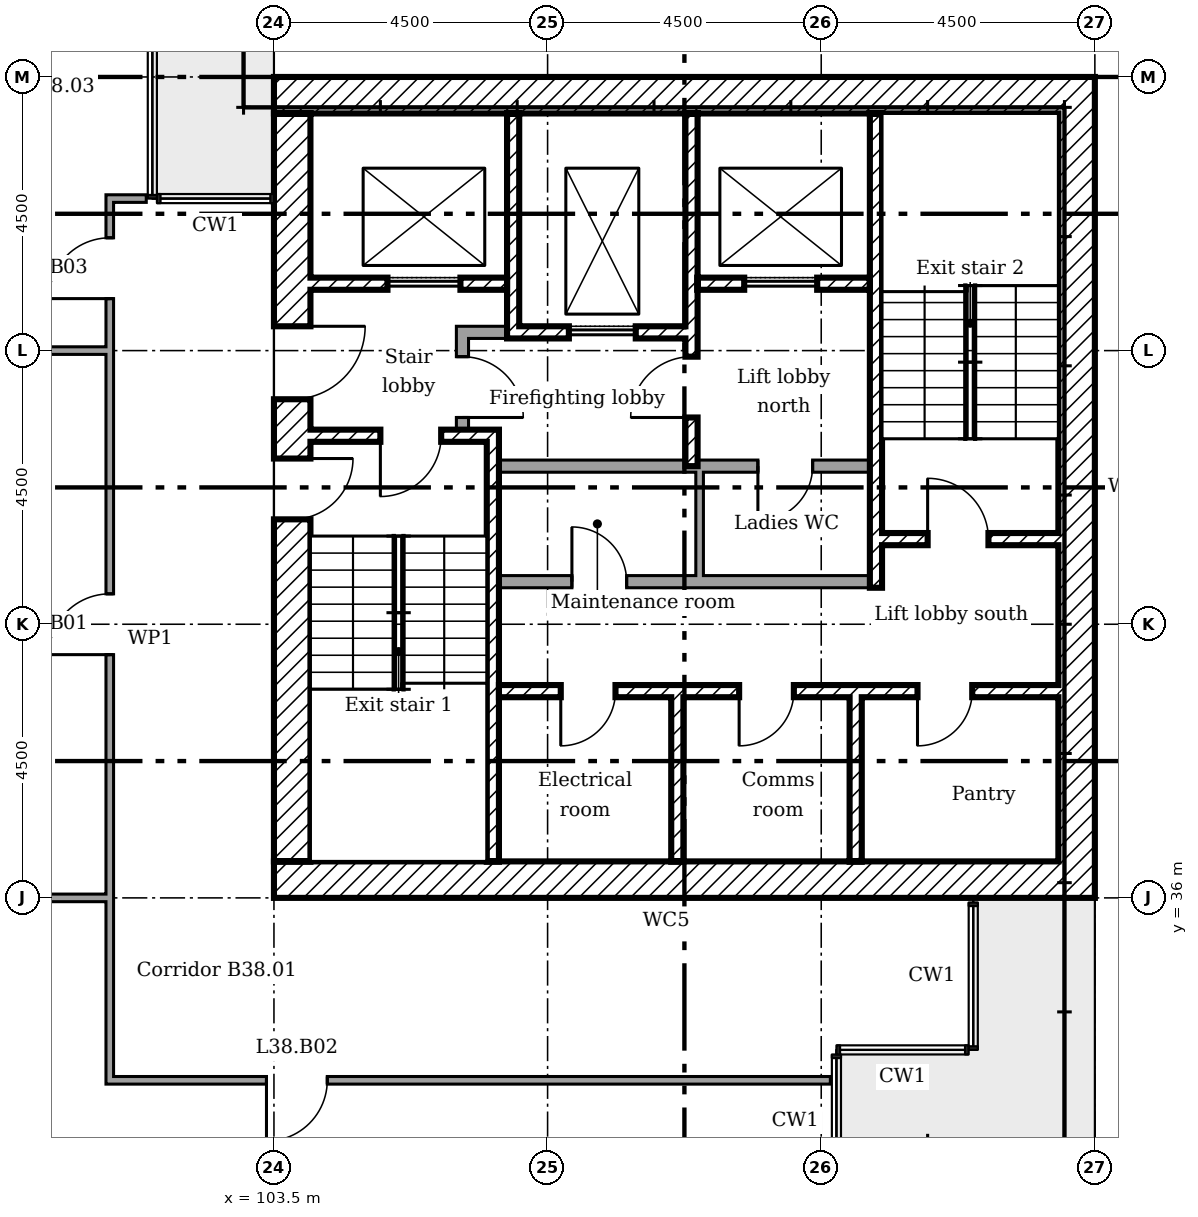
"""IFC4 building model, lengths in metres.
Left out: names, types, materials, properties, quantities, classifications, styles, units other than length and angle.
Written with IfcOpenShell. Run it as: python <this file> out.ifc"""

import sys

from ifc_helpers import new_model, si_unit, direction, frame, frame_2d, origin, place, context, subcontext, project, spatial, rectangle, extrude, element, fill, save


model = new_model("IFC4")
c1 = context("Model", 3, precision=1e-05, world=origin(), true_north=direction((0.0, 1.0)))
c2 = subcontext(c1, "Body", "Model", "MODEL_VIEW")
j1 = project(units=[si_unit("LENGTHUNIT", "METRE"), si_unit("PLANEANGLEUNIT", "RADIAN")], contexts=[c1])
p1 = place(None, origin())
s1 = spatial("IfcSite", under=j1, at=p1, CompositionType="ELEMENT")
p2 = place(p1, origin())
s2 = spatial("IfcBuilding", under=s1, at=p2, CompositionType="ELEMENT")
p3 = place(p2, frame((0.0, 0.0, 154.6)))
s3 = spatial("IfcBuildingStorey", under=s2, at=p3, CompositionType="ELEMENT", Elevation=154.6)
p4 = place(p3, frame((116.7, 36.0, 0.0), z_axis=(0.0, 0.0, 1.0), x_axis=(0.0, 1.0, 0.0)))
e1 = element("IfcWall", 1, at=p4, inside=s3, PredefinedType="SHEAR", context=c2, shape_type="SweptSolid", body=[
    extrude(rectangle(XDim=13.5, YDim=0.6, at=frame_2d((6.75, 0.0))), origin(), (0.0, 0.0, 1.0), 3.35),
])
for number, where in (
    (2, (103.5, 49.2, 0.0)),
    (3, (103.5, 36.3, 0.0)),
):
    element("IfcWall", number, at=place(p3, frame(where)), inside=s3, PredefinedType="SHEAR", context=c2, shape_type="SweptSolid", body=[
        extrude(rectangle(XDim=12.9, YDim=0.6, at=frame_2d((6.45, 0.0))), origin(), (0.0, 0.0, 1.0), 3.35),
    ])
p5 = place(p3, frame((103.8, 36.6, 0.0), z_axis=(0.0, 0.0, 1.0), x_axis=(0.0, 1.0, 0.0)))
e4 = element("IfcWall", 4, at=p5, inside=s3, PredefinedType="SHEAR", context=c2, shape_type="SweptSolid", body=[
    extrude(rectangle(XDim=12.3, YDim=0.6, at=frame_2d((6.15, 0.0))), origin(), (0.0, 0.0, 1.0), 3.35),
])
p6 = place(p5, frame((7.6, 0.0, 0.0)))
e5 = element("IfcOpeningElement", 5, at=p6, cuts=e4, PredefinedType="OPENING", context=c2, shape_type="SweptSolid", body=[
    extrude(rectangle(XDim=1.2, YDim=2.1, at=frame_2d((0.6, 1.05))), frame((0.0, 0.31, 0.0), z_axis=(0.0, -1.0, 0.0), x_axis=(1.0, 0.0, 0.0)), (0.0, 0.0, 1.0), 0.62),
])
p7 = place(p5, frame((5.625, 0.0, 0.0)))
e6 = element("IfcOpeningElement", 6, at=p7, cuts=e4, PredefinedType="OPENING", context=c2, shape_type="SweptSolid", body=[
    extrude(rectangle(XDim=1.0, YDim=2.1, at=frame_2d((0.5, 1.05))), frame((0.0, 0.31, 0.0), z_axis=(0.0, -1.0, 0.0), x_axis=(1.0, 0.0, 0.0)), (0.0, 0.0, 1.0), 0.62),
])
p8 = place(p3, frame((107.433, 48.9, 0.0), z_axis=(0.0, 0.0, 1.0), x_axis=(0.0, -1.0, 0.0)))
e7 = element("IfcWall", 7, at=p8, inside=s3, PredefinedType="SHEAR", context=c2, shape_type="SweptSolid", body=[
    extrude(rectangle(XDim=3.7, YDim=0.2, at=frame_2d((1.85, 0.0))), origin(), (0.0, 0.0, 1.0), 3.35),
])
p9 = place(p3, frame((110.367, 48.9, 0.0), z_axis=(0.0, 0.0, 1.0), x_axis=(0.0, -1.0, 0.0)))
e8 = element("IfcWall", 8, at=p9, inside=s3, PredefinedType="SHEAR", context=c2, shape_type="SweptSolid", body=[
    extrude(rectangle(XDim=5.8, YDim=0.2, at=frame_2d((2.9, 0.0))), origin(), (0.0, 0.0, 1.0), 3.35),
])
p10 = place(p9, frame((4.0, 0.0, 0.0)))
e9 = element("IfcOpeningElement", 9, at=p10, cuts=e8, PredefinedType="OPENING", context=c2, shape_type="SweptSolid", body=[
    extrude(rectangle(XDim=1.0, YDim=2.1, at=frame_2d((0.5, 1.05))), frame((0.0, 0.11, 0.0), z_axis=(0.0, -1.0, 0.0), x_axis=(1.0, 0.0, 0.0)), (0.0, 0.0, 1.0), 0.22),
])
for number, where, z_axis, x_axis in (
    (10, (110.133, 36.6, 0.0), (0.0, 0.0, 1.0), (0.0, 1.0, 0.0)),
    (11, (113.067, 36.6, 0.0), (0.0, 0.0, 1.0), (0.0, 1.0, 0.0)),
):
    element("IfcWall", number, at=place(p3, frame(where, z_axis=z_axis, x_axis=x_axis)), inside=s3, PredefinedType="SHEAR", context=c2, shape_type="SweptSolid", body=[
        extrude(rectangle(XDim=2.7, YDim=0.2, at=frame_2d((1.35, 0.0))), origin(), (0.0, 0.0, 1.0), 3.35),
    ])
p11 = place(p3, frame((106.5, 45.3, 0.0)))
e12 = element("IfcWall", 12, at=p11, inside=s3, PredefinedType="PARTITIONING", context=c2, shape_type="SweptSolid", body=[
    extrude(rectangle(XDim=0.833, YDim=0.2, at=frame_2d((0.417, 0.0))), origin(), (0.0, 0.0, 1.0), 3.35),
])
p12 = place(p3, frame((106.6, 43.7, 0.0), z_axis=(0.0, 0.0, 1.0), x_axis=(0.0, 1.0, 0.0)))
e13 = element("IfcWall", 13, at=p12, inside=s3, PredefinedType="PARTITIONING", context=c2, shape_type="SweptSolid", body=[
    extrude(rectangle(XDim=1.5, YDim=0.2, at=frame_2d((0.75, 0.0))), origin(), (0.0, 0.0, 1.0), 3.35),
])
p13 = place(p12, frame((0.2, 0.0, 0.0)))
e14 = element("IfcOpeningElement", 14, at=p13, cuts=e13, PredefinedType="OPENING", context=c2, shape_type="SweptSolid", body=[
    extrude(rectangle(XDim=1.0, YDim=2.1, at=frame_2d((0.5, 1.05))), frame((0.0, 0.11, 0.0), z_axis=(0.0, -1.0, 0.0), x_axis=(1.0, 0.0, 0.0)), (0.0, 0.0, 1.0), 0.22),
])
p14 = place(p3, frame((104.1, 46.1, 0.0)))
e15 = element("IfcWall", 15, at=p14, inside=s3, PredefinedType="SHEAR", context=c2, shape_type="SweptSolid", body=[
    extrude(rectangle(XDim=3.233, YDim=0.2, at=frame_2d((1.617, 0.0))), origin(), (0.0, 0.0, 1.0), 3.35),
])
p15 = place(p14, frame((1.267, 0.0, 0.0)))
e16 = element("IfcOpeningElement", 16, at=p15, cuts=e15, PredefinedType="OPENING", context=c2, shape_type="SweptSolid", body=[
    extrude(rectangle(XDim=1.2, YDim=2.1, at=frame_2d((0.6, 1.05))), frame((0.0, 0.11, 0.0), z_axis=(0.0, -1.0, 0.0), x_axis=(1.0, 0.0, 0.0)), (0.0, 0.0, 1.0), 0.22),
])
p16 = place(p3, frame((110.467, 46.1, 0.0)))
e17 = element("IfcWall", 17, at=p16, inside=s3, PredefinedType="SHEAR", context=c2, shape_type="SweptSolid", body=[
    extrude(rectangle(XDim=2.833, YDim=0.2, at=frame_2d((1.417, 0.0))), origin(), (0.0, 0.0, 1.0), 3.35),
])
p17 = place(p16, frame((0.767, 0.0, 0.0)))
e18 = element("IfcOpeningElement", 18, at=p17, cuts=e17, PredefinedType="OPENING", context=c2, shape_type="SweptSolid", body=[
    extrude(rectangle(XDim=1.2, YDim=2.1, at=frame_2d((0.6, 1.05))), frame((0.0, 0.11, 0.0), z_axis=(0.0, -1.0, 0.0), x_axis=(1.0, 0.0, 0.0)), (0.0, 0.0, 1.0), 0.22),
])
p18 = place(p3, frame((107.533, 45.3, 0.0)))
e19 = element("IfcWall", 19, at=p18, inside=s3, PredefinedType="SHEAR", context=c2, shape_type="SweptSolid", body=[
    extrude(rectangle(XDim=2.733, YDim=0.2, at=frame_2d((1.367, 0.0))), origin(), (0.0, 0.0, 1.0), 3.35),
])
p19 = place(p18, frame((0.817, 0.0, 0.0)))
e20 = element("IfcOpeningElement", 20, at=p19, cuts=e19, PredefinedType="OPENING", context=c2, shape_type="SweptSolid", body=[
    extrude(rectangle(XDim=1.1, YDim=2.1, at=frame_2d((0.55, 1.05))), frame((0.0, 0.11, 0.0), z_axis=(0.0, -1.0, 0.0), x_axis=(1.0, 0.0, 0.0)), (0.0, 0.0, 1.0), 0.22),
])
p20 = place(p3, frame((107.2, 39.4, 0.0)))
e21 = element("IfcWall", 21, at=p20, inside=s3, PredefinedType="SHEAR", context=c2, shape_type="SweptSolid", body=[
    extrude(rectangle(XDim=9.2, YDim=0.2, at=frame_2d((4.6, 0.0))), origin(), (0.0, 0.0, 1.0), 3.35),
])
p21 = place(p20, frame((1.017, 0.0, 0.0)))
e22 = element("IfcOpeningElement", 22, at=p21, cuts=e21, PredefinedType="OPENING", context=c2, shape_type="SweptSolid", body=[
    extrude(rectangle(XDim=0.9, YDim=2.1, at=frame_2d((0.45, 1.05))), frame((0.0, 0.11, 0.0), z_axis=(0.0, -1.0, 0.0), x_axis=(1.0, 0.0, 0.0)), (0.0, 0.0, 1.0), 0.22),
])
p22 = place(p20, frame((3.95, 0.0, 0.0)))
e23 = element("IfcOpeningElement", 23, at=p22, cuts=e21, PredefinedType="OPENING", context=c2, shape_type="SweptSolid", body=[
    extrude(rectangle(XDim=0.9, YDim=2.1, at=frame_2d((0.45, 1.05))), frame((0.0, 0.11, 0.0), z_axis=(0.0, -1.0, 0.0), x_axis=(1.0, 0.0, 0.0)), (0.0, 0.0, 1.0), 0.22),
])
p23 = place(p20, frame((6.883, 0.0, 0.0)))
e24 = element("IfcOpeningElement", 24, at=p23, cuts=e21, PredefinedType="OPENING", context=c2, shape_type="SweptSolid", body=[
    extrude(rectangle(XDim=0.9, YDim=2.1, at=frame_2d((0.45, 1.05))), frame((0.0, 0.11, 0.0), z_axis=(0.0, -1.0, 0.0), x_axis=(1.0, 0.0, 0.0)), (0.0, 0.0, 1.0), 0.22),
])
p24 = place(p3, frame((107.1, 36.6, 0.0), z_axis=(0.0, 0.0, 1.0), x_axis=(0.0, 1.0, 0.0)))
e25 = element("IfcWall", 25, at=p24, inside=s3, PredefinedType="SHEAR", context=c2, shape_type="SweptSolid", body=[
    extrude(rectangle(XDim=7.1, YDim=0.2, at=frame_2d((3.55, 0.0))), origin(), (0.0, 0.0, 1.0), 3.35),
])
p25 = place(p3, frame((104.1, 43.6, 0.0)))
e26 = element("IfcWall", 26, at=p25, inside=s3, PredefinedType="SHEAR", context=c2, shape_type="SweptSolid", body=[
    extrude(rectangle(XDim=2.9, YDim=0.2, at=frame_2d((1.45, 0.0))), origin(), (0.0, 0.0, 1.0), 3.35),
])
p26 = place(p25, frame((1.15, 0.0, 0.0)))
e27 = element("IfcOpeningElement", 27, at=p26, cuts=e26, PredefinedType="OPENING", context=c2, shape_type="SweptSolid", body=[
    extrude(rectangle(XDim=1.0, YDim=2.1, at=frame_2d((0.5, 1.05))), frame((0.0, 0.11, 0.0), z_axis=(0.0, -1.0, 0.0), x_axis=(1.0, 0.0, 0.0)), (0.0, 0.0, 1.0), 0.22),
])
p27 = place(p3, frame((113.5, 41.9, 0.0)))
e28 = element("IfcWall", 28, at=p27, inside=s3, PredefinedType="SHEAR", context=c2, shape_type="SweptSolid", body=[
    extrude(rectangle(XDim=2.9, YDim=0.2, at=frame_2d((1.45, 0.0))), origin(), (0.0, 0.0, 1.0), 3.35),
])
p28 = place(p27, frame((0.75, 0.0, 0.0)))
e29 = element("IfcOpeningElement", 29, at=p28, cuts=e28, PredefinedType="OPENING", context=c2, shape_type="SweptSolid", body=[
    extrude(rectangle(XDim=1.0, YDim=2.1, at=frame_2d((0.5, 1.05))), frame((0.0, 0.11, 0.0), z_axis=(0.0, -1.0, 0.0), x_axis=(1.0, 0.0, 0.0)), (0.0, 0.0, 1.0), 0.22),
])
p29 = place(p3, frame((113.4, 41.1, 0.0), z_axis=(0.0, 0.0, 1.0), x_axis=(0.0, 1.0, 0.0)))
e30 = element("IfcWall", 30, at=p29, inside=s3, PredefinedType="SHEAR", context=c2, shape_type="SweptSolid", body=[
    extrude(rectangle(XDim=7.8, YDim=0.2, at=frame_2d((3.9, 0.0))), origin(), (0.0, 0.0, 1.0), 3.35),
])
p30 = place(p3, frame((107.2, 43.1, 0.0)))
e31 = element("IfcWall", 31, at=p30, inside=s3, PredefinedType="PARTITIONING", context=c2, shape_type="SweptSolid", body=[
    extrude(rectangle(XDim=6.1, YDim=0.2, at=frame_2d((3.05, 0.0))), origin(), (0.0, 0.0, 1.0), 3.35),
])
p31 = place(p30, frame((4.259, 0.0, 0.0)))
e32 = element("IfcOpeningElement", 32, at=p31, cuts=e31, PredefinedType="OPENING", context=c2, shape_type="SweptSolid", body=[
    extrude(rectangle(XDim=0.9, YDim=2.1, at=frame_2d((0.45, 1.05))), frame((0.0, 0.11, 0.0), z_axis=(0.0, -1.0, 0.0), x_axis=(1.0, 0.0, 0.0)), (0.0, 0.0, 1.0), 0.22),
])
p32 = place(p3, frame((107.2, 41.2, 0.0)))
e33 = element("IfcWall", 33, at=p32, inside=s3, PredefinedType="PARTITIONING", context=c2, shape_type="SweptSolid", body=[
    extrude(rectangle(XDim=6.1, YDim=0.2, at=frame_2d((3.05, 0.0))), origin(), (0.0, 0.0, 1.0), 3.35),
])
p33 = place(p32, frame((1.2, 0.0, 0.0)))
e34 = element("IfcOpeningElement", 34, at=p33, cuts=e33, PredefinedType="OPENING", context=c2, shape_type="SweptSolid", body=[
    extrude(rectangle(XDim=0.9, YDim=2.1, at=frame_2d((0.45, 1.05))), frame((0.0, 0.11, 0.0), z_axis=(0.0, -1.0, 0.0), x_axis=(1.0, 0.0, 0.0)), (0.0, 0.0, 1.0), 0.22),
])
p34 = place(p3, frame((110.5, 41.3, 0.0), z_axis=(0.0, 0.0, 1.0), x_axis=(0.0, 1.0, 0.0)))
e35 = element("IfcWall", 35, at=p34, inside=s3, PredefinedType="PARTITIONING", context=c2, shape_type="SweptSolid", body=[
    extrude(rectangle(XDim=1.7, YDim=0.125, at=frame_2d((0.85, 0.0))), origin(), (0.0, 0.0, 1.0), 3.35),
])
p35 = place(p3, frame((100.738, 33.0, 0.0)))
e36 = element("IfcWall", 36, at=p35, inside=s3, PredefinedType="PARTITIONING", context=c2, shape_type="SweptSolid", body=[
    extrude(rectangle(XDim=11.912, YDim=0.125, at=frame_2d((5.956, 0.0))), origin(), (0.0, 0.0, 1.0), 3.45),
])
p36 = place(p35, frame((2.639, 0.0, 0.0)))
e37 = element("IfcOpeningElement", 37, at=p36, cuts=e36, PredefinedType="OPENING", context=c2, shape_type="SweptSolid", body=[
    extrude(rectangle(XDim=1.0, YDim=2.1, at=frame_2d((0.5, 1.05))), frame((0.0, 0.073, 0.0), z_axis=(0.0, -1.0, 0.0), x_axis=(1.0, 0.0, 0.0)), (0.0, 0.0, 1.0), 0.145),
])
p37 = place(p3, frame((99.35, 36.0, 0.0)))
e38 = element("IfcWall", 38, at=p37, inside=s3, PredefinedType="PARTITIONING", context=c2, shape_type="SweptSolid", body=[
    extrude(rectangle(XDim=1.45, YDim=0.125, at=frame_2d((0.725, 0.0))), origin(), (0.0, 0.0, 1.0), 2.842),
])
p38 = place(p3, frame((96.6, 45.0, 0.0)))
e39 = element("IfcWall", 39, at=p38, inside=s3, PredefinedType="PARTITIONING", context=c2, shape_type="SweptSolid", body=[
    extrude(rectangle(XDim=4.2, YDim=0.125, at=frame_2d((2.1, 0.0))), origin(), (0.0, 0.0, 1.0), 2.851),
])
p39 = place(p3, frame((100.738, 47.5, 0.0)))
e40 = element("IfcWall", 40, at=p39, inside=s3, PredefinedType="PARTITIONING", context=c2, shape_type="SweptSolid", body=[
    extrude(rectangle(XDim=0.662, YDim=0.125, at=frame_2d((0.331, 0.0))), origin(), (0.0, 0.0, 1.0), 3.45),
])
p40 = place(p3, frame((100.8, 33.062, 0.0), z_axis=(0.0, 0.0, 1.0), x_axis=(0.0, 1.0, 0.0)))
e41 = element("IfcWall", 41, at=p40, inside=s3, PredefinedType="PARTITIONING", context=c2, shape_type="SweptSolid", body=[
    extrude(rectangle(XDim=14.375, YDim=0.125, at=frame_2d((7.188, 0.0))), origin(), (0.0, 0.0, 1.0), 3.45),
])
p41 = place(p40, frame((6.938, 0.0, 0.0)))
e42 = element("IfcOpeningElement", 42, at=p41, cuts=e41, PredefinedType="OPENING", context=c2, shape_type="SweptSolid", body=[
    extrude(rectangle(XDim=1.0, YDim=2.1, at=frame_2d((0.5, 1.05))), frame((0.0, 0.073, 0.0), z_axis=(0.0, -1.0, 0.0), x_axis=(1.0, 0.0, 0.0)), (0.0, 0.0, 1.0), 0.145),
])
p42 = place(p40, frame((12.792, 0.0, 0.0)))
e43 = element("IfcOpeningElement", 43, at=p42, cuts=e41, PredefinedType="OPENING", context=c2, shape_type="SweptSolid", body=[
    extrude(rectangle(XDim=1.0, YDim=2.1, at=frame_2d((0.5, 1.05))), frame((0.0, 0.073, 0.0), z_axis=(0.0, -1.0, 0.0), x_axis=(1.0, 0.0, 0.0)), (0.0, 0.0, 1.0), 0.145),
])
p43 = place(p6, frame((1.2, 0.0, 0.0), x_axis=(-1.0, 0.0, 0.0)))
e44 = element("IfcDoor", 44, at=p43, inside=s3, OperationType="SINGLE_SWING_RIGHT", PredefinedType="DOOR", context=c2, shape_type="SweptSolid", body=[
    extrude(rectangle(XDim=1.2, YDim=2.1, at=frame_2d((0.6, 1.05))), frame((0.0, 0.025, 0.0), z_axis=(0.0, -1.0, 0.0), x_axis=(1.0, 0.0, 0.0)), (0.0, 0.0, 1.0), 0.05),
])
fill(e5, e44)
p44 = place(p26, frame((1.0, 0.0, 0.0), x_axis=(-1.0, 0.0, 0.0)))
e45 = element("IfcDoor", 45, at=p44, inside=s3, OperationType="SINGLE_SWING_LEFT", PredefinedType="DOOR", context=c2, shape_type="SweptSolid", body=[
    extrude(rectangle(XDim=1.0, YDim=2.1, at=frame_2d((0.5, 1.05))), frame((0.0, 0.025, 0.0), z_axis=(0.0, -1.0, 0.0), x_axis=(1.0, 0.0, 0.0)), (0.0, 0.0, 1.0), 0.05),
])
fill(e27, e45)
p45 = place(p7, frame((1.0, 0.0, 0.0), x_axis=(-1.0, 0.0, 0.0)))
e46 = element("IfcDoor", 46, at=p45, inside=s3, OperationType="SINGLE_SWING_RIGHT", PredefinedType="DOOR", context=c2, shape_type="SweptSolid", body=[
    extrude(rectangle(XDim=1.0, YDim=2.1, at=frame_2d((0.5, 1.05))), frame((0.0, 0.025, 0.0), z_axis=(0.0, -1.0, 0.0), x_axis=(1.0, 0.0, 0.0)), (0.0, 0.0, 1.0), 0.05),
])
fill(e6, e46)
p46 = place(p28, origin())
e47 = element("IfcDoor", 47, at=p46, inside=s3, OperationType="SINGLE_SWING_RIGHT", PredefinedType="DOOR", context=c2, shape_type="SweptSolid", body=[
    extrude(rectangle(XDim=1.0, YDim=2.1, at=frame_2d((0.5, 1.05))), frame((0.0, 0.025, 0.0), z_axis=(0.0, -1.0, 0.0), x_axis=(1.0, 0.0, 0.0)), (0.0, 0.0, 1.0), 0.05),
])
fill(e29, e47)
p47 = place(p10, frame((1.0, 0.0, 0.0), x_axis=(-1.0, 0.0, 0.0)))
e48 = element("IfcDoor", 48, at=p47, inside=s3, OperationType="SINGLE_SWING_RIGHT", PredefinedType="DOOR", context=c2, shape_type="SweptSolid", body=[
    extrude(rectangle(XDim=1.0, YDim=2.1, at=frame_2d((0.5, 1.05))), frame((0.0, 0.025, 0.0), z_axis=(0.0, -1.0, 0.0), x_axis=(1.0, 0.0, 0.0)), (0.0, 0.0, 1.0), 0.05),
])
fill(e9, e48)
p48 = place(p13, frame((1.0, 0.0, 0.0), x_axis=(-1.0, 0.0, 0.0)))
e49 = element("IfcDoor", 49, at=p48, inside=s3, OperationType="SINGLE_SWING_LEFT", PredefinedType="DOOR", context=c2, shape_type="SweptSolid", body=[
    extrude(rectangle(XDim=1.0, YDim=2.1, at=frame_2d((0.5, 1.05))), frame((0.0, 0.025, 0.0), z_axis=(0.0, -1.0, 0.0), x_axis=(1.0, 0.0, 0.0)), (0.0, 0.0, 1.0), 0.05),
])
fill(e14, e49)
p49 = place(p21, frame((0.9, 0.0, 0.0), x_axis=(-1.0, 0.0, 0.0)))
e50 = element("IfcDoor", 50, at=p49, inside=s3, OperationType="SINGLE_SWING_LEFT", PredefinedType="DOOR", context=c2, shape_type="SweptSolid", body=[
    extrude(rectangle(XDim=0.9, YDim=2.1, at=frame_2d((0.45, 1.05))), frame((0.0, 0.025, 0.0), z_axis=(0.0, -1.0, 0.0), x_axis=(1.0, 0.0, 0.0)), (0.0, 0.0, 1.0), 0.05),
])
fill(e22, e50)
p50 = place(p22, frame((0.9, 0.0, 0.0), x_axis=(-1.0, 0.0, 0.0)))
e51 = element("IfcDoor", 51, at=p50, inside=s3, OperationType="SINGLE_SWING_LEFT", PredefinedType="DOOR", context=c2, shape_type="SweptSolid", body=[
    extrude(rectangle(XDim=0.9, YDim=2.1, at=frame_2d((0.45, 1.05))), frame((0.0, 0.025, 0.0), z_axis=(0.0, -1.0, 0.0), x_axis=(1.0, 0.0, 0.0)), (0.0, 0.0, 1.0), 0.05),
])
fill(e23, e51)
p51 = place(p23, frame((0.9, 0.0, 0.0), x_axis=(-1.0, 0.0, 0.0)))
e52 = element("IfcDoor", 52, at=p51, inside=s3, OperationType="SINGLE_SWING_LEFT", PredefinedType="DOOR", context=c2, shape_type="SweptSolid", body=[
    extrude(rectangle(XDim=0.9, YDim=2.1, at=frame_2d((0.45, 1.05))), frame((0.0, 0.025, 0.0), z_axis=(0.0, -1.0, 0.0), x_axis=(1.0, 0.0, 0.0)), (0.0, 0.0, 1.0), 0.05),
])
fill(e24, e52)
p52 = place(p33, origin())
e53 = element("IfcDoor", 53, at=p52, inside=s3, OperationType="SINGLE_SWING_RIGHT", PredefinedType="DOOR", context=c2, shape_type="SweptSolid", body=[
    extrude(rectangle(XDim=0.9, YDim=2.1, at=frame_2d((0.45, 1.05))), frame((0.0, 0.025, 0.0), z_axis=(0.0, -1.0, 0.0), x_axis=(1.0, 0.0, 0.0)), (0.0, 0.0, 1.0), 0.05),
])
fill(e34, e53)
p53 = place(p31, frame((0.9, 0.0, 0.0), x_axis=(-1.0, 0.0, 0.0)))
e54 = element("IfcDoor", 54, at=p53, inside=s3, OperationType="SINGLE_SWING_LEFT", PredefinedType="DOOR", context=c2, shape_type="SweptSolid", body=[
    extrude(rectangle(XDim=0.9, YDim=2.1, at=frame_2d((0.45, 1.05))), frame((0.0, 0.025, 0.0), z_axis=(0.0, -1.0, 0.0), x_axis=(1.0, 0.0, 0.0)), (0.0, 0.0, 1.0), 0.05),
])
fill(e32, e54)
p54 = place(p19, origin())
e55 = element("IfcDoor", 55, at=p54, inside=s3, OperationType="SLIDING_TO_LEFT", PredefinedType="DOOR", context=c2, shape_type="SweptSolid", body=[
    extrude(rectangle(XDim=1.1, YDim=2.1, at=frame_2d((0.55, 1.05))), frame((0.0, 0.025, 0.0), z_axis=(0.0, -1.0, 0.0), x_axis=(1.0, 0.0, 0.0)), (0.0, 0.0, 1.0), 0.05),
])
fill(e20, e55)
p55 = place(p15, origin())
e56 = element("IfcDoor", 56, at=p55, inside=s3, OperationType="SLIDING_TO_LEFT", PredefinedType="DOOR", context=c2, shape_type="SweptSolid", body=[
    extrude(rectangle(XDim=1.2, YDim=2.1, at=frame_2d((0.6, 1.05))), frame((0.0, 0.025, 0.0), z_axis=(0.0, -1.0, 0.0), x_axis=(1.0, 0.0, 0.0)), (0.0, 0.0, 1.0), 0.05),
])
fill(e16, e56)
p56 = place(p17, origin())
e57 = element("IfcDoor", 57, at=p56, inside=s3, OperationType="SLIDING_TO_LEFT", PredefinedType="DOOR", context=c2, shape_type="SweptSolid", body=[
    extrude(rectangle(XDim=1.2, YDim=2.1, at=frame_2d((0.6, 1.05))), frame((0.0, 0.025, 0.0), z_axis=(0.0, -1.0, 0.0), x_axis=(1.0, 0.0, 0.0)), (0.0, 0.0, 1.0), 0.05),
])
fill(e18, e57)
p57 = place(p41, origin())
e58 = element("IfcDoor", 58, at=p57, inside=s3, OperationType="SINGLE_SWING_RIGHT", PredefinedType="DOOR", context=c2, shape_type="SweptSolid", body=[
    extrude(rectangle(XDim=1.0, YDim=2.1, at=frame_2d((0.5, 1.05))), frame((0.0, 0.025, 0.0), z_axis=(0.0, -1.0, 0.0), x_axis=(1.0, 0.0, 0.0)), (0.0, 0.0, 1.0), 0.05),
])
fill(e42, e58)
p58 = place(p36, frame((1.0, 0.0, 0.0), x_axis=(-1.0, 0.0, 0.0)))
e59 = element("IfcDoor", 59, at=p58, inside=s3, OperationType="SINGLE_SWING_LEFT", PredefinedType="DOOR", context=c2, shape_type="SweptSolid", body=[
    extrude(rectangle(XDim=1.0, YDim=2.1, at=frame_2d((0.5, 1.05))), frame((0.0, 0.025, 0.0), z_axis=(0.0, -1.0, 0.0), x_axis=(1.0, 0.0, 0.0)), (0.0, 0.0, 1.0), 0.05),
])
fill(e37, e59)
p59 = place(p42, origin())
e60 = element("IfcDoor", 60, at=p59, inside=s3, OperationType="SINGLE_SWING_RIGHT", PredefinedType="DOOR", context=c2, shape_type="SweptSolid", body=[
    extrude(rectangle(XDim=1.0, YDim=2.1, at=frame_2d((0.5, 1.05))), frame((0.0, 0.025, 0.0), z_axis=(0.0, -1.0, 0.0), x_axis=(1.0, 0.0, 0.0)), (0.0, 0.0, 1.0), 0.05),
])
fill(e43, e60)
save(model, sys.argv[1])
